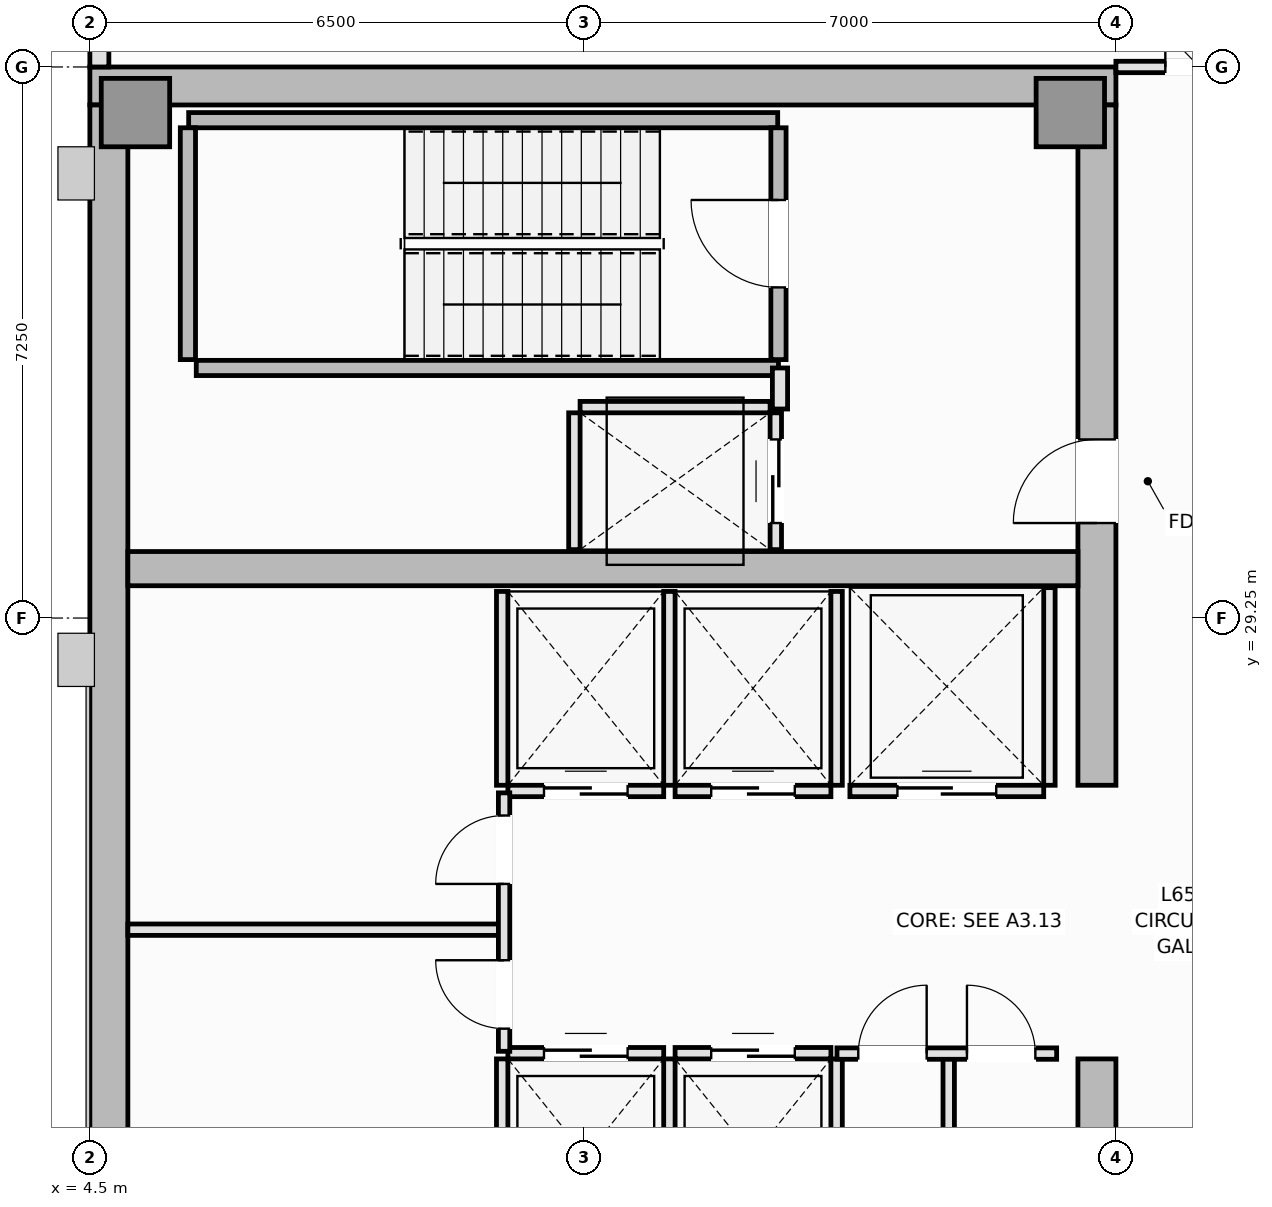
"""IFC4 building model, lengths in metres.
Left out: names, types, materials, properties, quantities, classifications, styles, units other than length and angle.
Written with IfcOpenShell. Run it as: python <this file> out.ifc"""

import sys

from ifc_helpers import new_model, si_unit, direction, frame, frame_2d, origin, origin_2d, place, context, subcontext, project, spatial, rectangle, extrude, element, fill, save


model = new_model("IFC4")
c1 = context("Model", 3, precision=1e-05, world=origin(), true_north=direction((0.0, 1.0)))
c2 = subcontext(c1, "Body", "Model", "MODEL_VIEW")
j1 = project(units=[si_unit("LENGTHUNIT", "METRE"), si_unit("PLANEANGLEUNIT", "RADIAN")], contexts=[c1])
p1 = place(None, origin())
s1 = spatial("IfcSite", under=j1, at=p1, CompositionType="ELEMENT")
p2 = place(p1, origin())
s2 = spatial("IfcBuilding", under=s1, at=p2, CompositionType="ELEMENT")
p3 = place(p2, frame((0.0, 0.0, 244.85)))
s3 = spatial("IfcBuildingStorey", under=s2, at=p3, CompositionType="ELEMENT", Elevation=244.85)
p4 = place(p3, frame((4.5, 36.25, 0.0), z_axis=(0.0, 0.0, 1.0), x_axis=(1.0, 0.0, 0.0)))
e1 = element("IfcWall", 1, at=p4, inside=s3, PredefinedType="SHEAR", context=c2, shape_type="SweptSolid", body=[
    extrude(rectangle(XDim=13.5, YDim=0.5, at=frame_2d((6.75, 0.0))), origin(), (0.0, 0.0, 1.0), 4.4),
])
p5 = place(p3, frame((4.75, 14.5, 0.0), z_axis=(0.0, 0.0, 1.0), x_axis=(0.0, 1.0, 0.0)))
e2 = element("IfcWall", 2, at=p5, inside=s3, PredefinedType="SHEAR", context=c2, shape_type="SweptSolid", body=[
    extrude(rectangle(XDim=21.5, YDim=0.5, at=frame_2d((10.75, 0.0))), origin(), (0.0, 0.0, 1.0), 4.4),
])
p6 = place(p3, frame((17.75, 14.5, 0.0), z_axis=(0.0, 0.0, 1.0), x_axis=(0.0, 1.0, 0.0)))
e3 = element("IfcWall", 3, at=p6, inside=s3, PredefinedType="SHEAR", context=c2, shape_type="SweptSolid", body=[
    extrude(rectangle(XDim=8.95, YDim=0.5, at=frame_2d((4.475, 0.0))), origin(), (0.0, 0.0, 1.0), 4.4),
])
p7 = place(p6, frame((4.4, 0.0, 0.0)))
e4 = element("IfcOpeningElement", 4, at=p7, cuts=e3, PredefinedType="OPENING", context=c2, shape_type="SweptSolid", body=[
    extrude(rectangle(XDim=1.1, YDim=2.15, at=frame_2d((0.55, 1.075))), frame((0.0, 0.26, 0.0), z_axis=(0.0, -1.0, 0.0), x_axis=(1.0, 0.0, 0.0)), (0.0, 0.0, 1.0), 0.52),
])
p8 = place(p3, frame((17.75, 27.05, 0.0), z_axis=(0.0, 0.0, 1.0), x_axis=(0.0, 1.0, 0.0)))
e5 = element("IfcWall", 5, at=p8, inside=s3, PredefinedType="SHEAR", context=c2, shape_type="SweptSolid", body=[
    extrude(rectangle(XDim=8.95, YDim=0.5, at=frame_2d((4.475, 0.0))), origin(), (0.0, 0.0, 1.0), 4.4),
])
p9 = place(p8, frame((3.45, 0.0, 0.0)))
e6 = element("IfcOpeningElement", 6, at=p9, cuts=e5, PredefinedType="OPENING", context=c2, shape_type="SweptSolid", body=[
    extrude(rectangle(XDim=1.1, YDim=2.15, at=frame_2d((0.55, 1.075))), frame((0.0, 0.26, 0.0), z_axis=(0.0, -1.0, 0.0), x_axis=(1.0, 0.0, 0.0)), (0.0, 0.0, 1.0), 0.52),
])
p10 = place(p3, frame((5.0, 29.9, 0.0), z_axis=(0.0, 0.0, 1.0), x_axis=(1.0, 0.0, 0.0)))
e7 = element("IfcWall", 7, at=p10, inside=s3, PredefinedType="SHEAR", context=c2, shape_type="SweptSolid", body=[
    extrude(rectangle(XDim=12.5, YDim=0.45, at=frame_2d((6.25, 0.0))), origin(), (0.0, 0.0, 1.0), 4.4),
])
for number, where, z_axis, x_axis in (
    (8, (5.1, 35.9, 0.0), (0.0, 0.0, 1.0), (1.0, 0.0, 0.0)),
    (9, (17.4, 35.9, 0.0), (0.0, 0.0, 1.0), (1.0, 0.0, 0.0)),
):
    element("IfcColumn", number, at=place(p3, frame(where, z_axis=z_axis, x_axis=x_axis)), inside=s3, PredefinedType="PILASTER", context=c2, shape_type="SweptSolid", body=[
        extrude(rectangle(XDim=0.9, YDim=0.9, at=origin_2d()), origin(), (0.0, 0.0, 1.0), 4.4),
    ])
p11 = place(p3, frame((4.625, 39.4, 0.0), z_axis=(0.0, 0.0, 1.0), x_axis=(0.0, -1.0, 0.0)))
e10 = element("IfcWall", 10, at=p11, inside=s3, PredefinedType="SOLIDWALL", context=c2, shape_type="SweptSolid", body=[
    extrude(rectangle(XDim=2.9, YDim=0.25, at=frame_2d((1.45, 0.0))), origin(), (0.0, 0.0, 1.0), 4.24),
])
p12 = place(p3, frame((5.8, 35.8, 0.0), z_axis=(0.0, 0.0, 1.0), x_axis=(1.0, 0.0, 0.0)))
e11 = element("IfcWall", 11, at=p12, inside=s3, PredefinedType="SOLIDWALL", context=c2, shape_type="SweptSolid", body=[
    extrude(rectangle(XDim=7.75, YDim=0.2, at=frame_2d((3.875, 0.0))), origin(), (0.0, 0.0, 1.0), 4.4),
])
p13 = place(p3, frame((5.79, 32.65, 0.0), z_axis=(0.0, 0.0, 1.0), x_axis=(0.0, 1.0, 0.0)))
e12 = element("IfcWall", 12, at=p13, inside=s3, PredefinedType="SOLIDWALL", context=c2, shape_type="SweptSolid", body=[
    extrude(rectangle(XDim=3.05, YDim=0.2, at=frame_2d((1.525, 0.0))), origin(), (0.0, 0.0, 1.0), 4.4),
])
p14 = place(p3, frame((5.9, 32.54, 0.0), z_axis=(0.0, 0.0, 1.0), x_axis=(1.0, 0.0, 0.0)))
e13 = element("IfcWall", 13, at=p14, inside=s3, PredefinedType="SOLIDWALL", context=c2, shape_type="SweptSolid", body=[
    extrude(rectangle(XDim=7.66, YDim=0.2, at=frame_2d((3.83, 0.0))), origin(), (0.0, 0.0, 1.0), 4.4),
])
p15 = place(p3, frame((13.56, 32.65, 0.0), z_axis=(0.0, 0.0, 1.0), x_axis=(0.0, 1.0, 0.0)))
e14 = element("IfcWall", 14, at=p15, inside=s3, PredefinedType="SOLIDWALL", context=c2, shape_type="SweptSolid", body=[
    extrude(rectangle(XDim=3.05, YDim=0.2, at=frame_2d((1.525, 0.0))), origin(), (0.0, 0.0, 1.0), 4.4),
])
p16 = place(p15, frame((0.95, 0.0, 0.0)))
e15 = element("IfcOpeningElement", 15, at=p16, cuts=e14, PredefinedType="OPENING", context=c2, shape_type="SweptSolid", body=[
    extrude(rectangle(XDim=1.15, YDim=2.15, at=frame_2d((0.575, 1.075))), frame((0.0, 0.11, 0.0), z_axis=(0.0, -1.0, 0.0), x_axis=(1.0, 0.0, 0.0)), (0.0, 0.0, 1.0), 0.22),
])
p17 = place(p3, frame((10.0, 23.525, 0.0), z_axis=(0.0, 0.0, 1.0), x_axis=(1.0, 0.0, 0.0)))
e16 = element("IfcWall", 16, at=p17, inside=s3, PredefinedType="PARTITIONING", context=c2, shape_type="SweptSolid", body=[
    extrude(rectangle(XDim=2.05, YDim=0.15, at=frame_2d((1.025, 0.0))), origin(), (0.0, 0.0, 1.0), 4.24),
])
p18 = place(p17, frame((0.475, 0.0, 0.0)))
e17 = element("IfcOpeningElement", 17, at=p18, cuts=e16, PredefinedType="OPENING", context=c2, shape_type="SweptSolid", body=[
    extrude(rectangle(XDim=1.1, YDim=2.2, at=frame_2d((0.55, 1.1))), frame((0.0, 0.085, 0.0), z_axis=(0.0, -1.0, 0.0), x_axis=(1.0, 0.0, 0.0)), (0.0, 0.0, 1.0), 0.17),
])
for number, where, z_axis, x_axis in (
    (18, (9.925, 20.9, 0.0), (0.0, 0.0, 1.0), (0.0, 1.0, 0.0)),
    (19, (12.125, 20.9, 0.0), (0.0, 0.0, 1.0), (0.0, 1.0, 0.0)),
):
    element("IfcWall", number, at=place(p3, frame(where, z_axis=z_axis, x_axis=x_axis)), inside=s3, PredefinedType="PARTITIONING", context=c2, shape_type="SweptSolid", body=[
        extrude(rectangle(XDim=2.55, YDim=0.15, at=frame_2d((1.275, 0.0))), origin(), (0.0, 0.0, 1.0), 4.24),
    ])
p19 = place(p3, frame((12.2, 23.525, 0.0), z_axis=(0.0, 0.0, 1.0), x_axis=(1.0, 0.0, 0.0)))
e20 = element("IfcWall", 20, at=p19, inside=s3, PredefinedType="PARTITIONING", context=c2, shape_type="SweptSolid", body=[
    extrude(rectangle(XDim=2.05, YDim=0.15, at=frame_2d((1.025, 0.0))), origin(), (0.0, 0.0, 1.0), 4.24),
])
p20 = place(p19, frame((0.475, 0.0, 0.0)))
e21 = element("IfcOpeningElement", 21, at=p20, cuts=e20, PredefinedType="OPENING", context=c2, shape_type="SweptSolid", body=[
    extrude(rectangle(XDim=1.1, YDim=2.2, at=frame_2d((0.55, 1.1))), frame((0.0, 0.085, 0.0), z_axis=(0.0, -1.0, 0.0), x_axis=(1.0, 0.0, 0.0)), (0.0, 0.0, 1.0), 0.17),
])
p21 = place(p3, frame((14.325, 20.9, 0.0), z_axis=(0.0, 0.0, 1.0), x_axis=(0.0, 1.0, 0.0)))
e22 = element("IfcWall", 22, at=p21, inside=s3, PredefinedType="PARTITIONING", context=c2, shape_type="SweptSolid", body=[
    extrude(rectangle(XDim=2.55, YDim=0.15, at=frame_2d((1.275, 0.0))), origin(), (0.0, 0.0, 1.0), 4.24),
])
p22 = place(p3, frame((10.0, 26.975, 0.0), z_axis=(0.0, 0.0, 1.0), x_axis=(1.0, 0.0, 0.0)))
e23 = element("IfcWall", 23, at=p22, inside=s3, PredefinedType="PARTITIONING", context=c2, shape_type="SweptSolid", body=[
    extrude(rectangle(XDim=2.05, YDim=0.15, at=frame_2d((1.025, 0.0))), origin(), (0.0, 0.0, 1.0), 4.24),
])
p23 = place(p22, frame((0.475, 0.0, 0.0)))
e24 = element("IfcOpeningElement", 24, at=p23, cuts=e23, PredefinedType="OPENING", context=c2, shape_type="SweptSolid", body=[
    extrude(rectangle(XDim=1.1, YDim=2.2, at=frame_2d((0.55, 1.1))), frame((0.0, 0.085, 0.0), z_axis=(0.0, -1.0, 0.0), x_axis=(1.0, 0.0, 0.0)), (0.0, 0.0, 1.0), 0.17),
])
for number, where, z_axis, x_axis in (
    (25, (9.925, 27.05, 0.0), (0.0, 0.0, 1.0), (0.0, 1.0, 0.0)),
    (26, (12.125, 27.05, 0.0), (0.0, 0.0, 1.0), (0.0, 1.0, 0.0)),
):
    element("IfcWall", number, at=place(p3, frame(where, z_axis=z_axis, x_axis=x_axis)), inside=s3, PredefinedType="PARTITIONING", context=c2, shape_type="SweptSolid", body=[
        extrude(rectangle(XDim=2.55, YDim=0.15, at=frame_2d((1.275, 0.0))), origin(), (0.0, 0.0, 1.0), 4.24),
    ])
p24 = place(p3, frame((12.2, 26.975, 0.0), z_axis=(0.0, 0.0, 1.0), x_axis=(1.0, 0.0, 0.0)))
e27 = element("IfcWall", 27, at=p24, inside=s3, PredefinedType="PARTITIONING", context=c2, shape_type="SweptSolid", body=[
    extrude(rectangle(XDim=2.05, YDim=0.15, at=frame_2d((1.025, 0.0))), origin(), (0.0, 0.0, 1.0), 4.24),
])
p25 = place(p24, frame((0.475, 0.0, 0.0)))
e28 = element("IfcOpeningElement", 28, at=p25, cuts=e27, PredefinedType="OPENING", context=c2, shape_type="SweptSolid", body=[
    extrude(rectangle(XDim=1.1, YDim=2.2, at=frame_2d((0.55, 1.1))), frame((0.0, 0.085, 0.0), z_axis=(0.0, -1.0, 0.0), x_axis=(1.0, 0.0, 0.0)), (0.0, 0.0, 1.0), 0.17),
])
p26 = place(p3, frame((14.325, 27.05, 0.0), z_axis=(0.0, 0.0, 1.0), x_axis=(0.0, 1.0, 0.0)))
e29 = element("IfcWall", 29, at=p26, inside=s3, PredefinedType="PARTITIONING", context=c2, shape_type="SweptSolid", body=[
    extrude(rectangle(XDim=2.55, YDim=0.15, at=frame_2d((1.275, 0.0))), origin(), (0.0, 0.0, 1.0), 4.24),
])
p27 = place(p3, frame((14.5, 26.975, 0.0), z_axis=(0.0, 0.0, 1.0), x_axis=(1.0, 0.0, 0.0)))
e30 = element("IfcWall", 30, at=p27, inside=s3, PredefinedType="PARTITIONING", context=c2, shape_type="SweptSolid", body=[
    extrude(rectangle(XDim=2.55, YDim=0.15, at=frame_2d((1.275, 0.0))), origin(), (0.0, 0.0, 1.0), 4.24),
])
p28 = place(p27, frame((0.625, 0.0, 0.0)))
e31 = element("IfcOpeningElement", 31, at=p28, cuts=e30, PredefinedType="OPENING", context=c2, shape_type="SweptSolid", body=[
    extrude(rectangle(XDim=1.3, YDim=2.2, at=frame_2d((0.65, 1.1))), frame((0.0, 0.085, 0.0), z_axis=(0.0, -1.0, 0.0), x_axis=(1.0, 0.0, 0.0)), (0.0, 0.0, 1.0), 0.17),
])
p29 = place(p3, frame((17.125, 27.05, 0.0), z_axis=(0.0, 0.0, 1.0), x_axis=(0.0, 1.0, 0.0)))
e32 = element("IfcWall", 32, at=p29, inside=s3, PredefinedType="PARTITIONING", context=c2, shape_type="SweptSolid", body=[
    extrude(rectangle(XDim=2.6, YDim=0.15, at=frame_2d((1.3, 0.0))), origin(), (0.0, 0.0, 1.0), 4.24),
])
p30 = place(p3, frame((10.95, 32.025, 0.0), z_axis=(0.0, 0.0, 1.0), x_axis=(1.0, 0.0, 0.0)))
e33 = element("IfcWall", 33, at=p30, inside=s3, PredefinedType="PARTITIONING", context=c2, shape_type="SweptSolid", body=[
    extrude(rectangle(XDim=2.5, YDim=0.15, at=frame_2d((1.25, 0.0))), origin(), (0.0, 0.0, 1.0), 4.24),
])
p31 = place(p3, frame((10.875, 30.15, 0.0), z_axis=(0.0, 0.0, 1.0), x_axis=(0.0, 1.0, 0.0)))
e34 = element("IfcWall", 34, at=p31, inside=s3, PredefinedType="PARTITIONING", context=c2, shape_type="SweptSolid", body=[
    extrude(rectangle(XDim=1.8, YDim=0.15, at=frame_2d((0.9, 0.0))), origin(), (0.0, 0.0, 1.0), 4.24),
])
p32 = place(p3, frame((13.525, 30.15, 0.0), z_axis=(0.0, 0.0, 1.0), x_axis=(0.0, 1.0, 0.0)))
e35 = element("IfcWall", 35, at=p32, inside=s3, PredefinedType="PARTITIONING", context=c2, shape_type="SweptSolid", body=[
    extrude(rectangle(XDim=1.8, YDim=0.15, at=frame_2d((0.9, 0.0))), origin(), (0.0, 0.0, 1.0), 4.24),
])
p33 = place(p32, frame((0.35, 0.0, 0.0)))
e36 = element("IfcOpeningElement", 36, at=p33, cuts=e35, PredefinedType="OPENING", context=c2, shape_type="SweptSolid", body=[
    extrude(rectangle(XDim=1.1, YDim=2.2, at=frame_2d((0.55, 1.1))), frame((0.0, 0.085, 0.0), z_axis=(0.0, -1.0, 0.0), x_axis=(1.0, 0.0, 0.0)), (0.0, 0.0, 1.0), 0.17),
])
p34 = place(p3, frame((13.58, 32.0, 0.0), z_axis=(0.0, 0.0, 1.0), x_axis=(0.0, 1.0, 0.0)))
e37 = element("IfcWall", 37, at=p34, inside=s3, PredefinedType="PARTITIONING", context=c2, shape_type="SweptSolid", body=[
    extrude(rectangle(XDim=0.54, YDim=0.2, at=frame_2d((0.27, 0.0))), origin(), (0.0, 0.0, 1.0), 4.24),
])
p35 = place(p3, frame((5.0, 25.15, 0.0), z_axis=(0.0, 0.0, 1.0), x_axis=(1.0, 0.0, 0.0)))
e38 = element("IfcWall", 38, at=p35, inside=s3, PredefinedType="PARTITIONING", context=c2, shape_type="SweptSolid", body=[
    extrude(rectangle(XDim=4.95, YDim=0.15, at=frame_2d((2.475, 0.0))), origin(), (0.0, 0.0, 1.0), 4.24),
])
p36 = place(p3, frame((9.95, 23.55, 0.0), z_axis=(0.0, 0.0, 1.0), x_axis=(0.0, 1.0, 0.0)))
e39 = element("IfcWall", 39, at=p36, inside=s3, PredefinedType="PARTITIONING", context=c2, shape_type="SweptSolid", body=[
    extrude(rectangle(XDim=3.4, YDim=0.15, at=frame_2d((1.7, 0.0))), origin(), (0.0, 0.0, 1.0), 4.24),
])
p37 = place(p36, frame((0.298, 0.0, 0.0)))
e40 = element("IfcOpeningElement", 40, at=p37, cuts=e39, PredefinedType="OPENING", context=c2, shape_type="SweptSolid", body=[
    extrude(rectangle(XDim=0.9, YDim=2.1, at=frame_2d((0.45, 1.05))), frame((0.0, 0.085, 0.0), z_axis=(0.0, -1.0, 0.0), x_axis=(1.0, 0.0, 0.0)), (0.0, 0.0, 1.0), 0.17),
])
p38 = place(p36, frame((2.202, 0.0, 0.0)))
e41 = element("IfcOpeningElement", 41, at=p38, cuts=e39, PredefinedType="OPENING", context=c2, shape_type="SweptSolid", body=[
    extrude(rectangle(XDim=0.9, YDim=2.1, at=frame_2d((0.45, 1.05))), frame((0.0, 0.085, 0.0), z_axis=(0.0, -1.0, 0.0), x_axis=(1.0, 0.0, 0.0)), (0.0, 0.0, 1.0), 0.17),
])
p39 = place(p3, frame((15.8, 20.85, 0.0), z_axis=(0.0, 0.0, 1.0), x_axis=(0.0, 1.0, 0.0)))
e42 = element("IfcWall", 42, at=p39, inside=s3, PredefinedType="PARTITIONING", context=c2, shape_type="SweptSolid", body=[
    extrude(rectangle(XDim=2.67, YDim=0.15, at=frame_2d((1.335, 0.0))), origin(), (0.0, 0.0, 1.0), 4.24),
])
p40 = place(p3, frame((14.33, 23.52, 0.0), z_axis=(0.0, 0.0, 1.0), x_axis=(1.0, 0.0, 0.0)))
e43 = element("IfcWall", 43, at=p40, inside=s3, PredefinedType="PARTITIONING", context=c2, shape_type="SweptSolid", body=[
    extrude(rectangle(XDim=2.89, YDim=0.15, at=frame_2d((1.445, 0.0))), origin(), (0.0, 0.0, 1.0), 4.24),
])
p41 = place(p40, frame((0.28, 0.0, 0.0)))
e44 = element("IfcOpeningElement", 44, at=p41, cuts=e43, PredefinedType="OPENING", context=c2, shape_type="SweptSolid", body=[
    extrude(rectangle(XDim=0.9, YDim=2.1, at=frame_2d((0.45, 1.05))), frame((0.0, 0.085, 0.0), z_axis=(0.0, -1.0, 0.0), x_axis=(1.0, 0.0, 0.0)), (0.0, 0.0, 1.0), 0.17),
])
p42 = place(p40, frame((1.71, 0.0, 0.0)))
e45 = element("IfcOpeningElement", 45, at=p42, cuts=e43, PredefinedType="OPENING", context=c2, shape_type="SweptSolid", body=[
    extrude(rectangle(XDim=0.9, YDim=2.1, at=frame_2d((0.45, 1.05))), frame((0.0, 0.085, 0.0), z_axis=(0.0, -1.0, 0.0), x_axis=(1.0, 0.0, 0.0)), (0.0, 0.0, 1.0), 0.17),
])
p43 = place(p3, frame((18.0, 36.5, 0.0), z_axis=(0.0, 0.0, 1.0), x_axis=(1.0, 0.0, 0.0)))
e46 = element("IfcWall", 46, at=p43, inside=s3, PredefinedType="PARTITIONING", context=c2, shape_type="SweptSolid", body=[
    extrude(rectangle(XDim=2.2, YDim=0.15, at=frame_2d((1.1, 0.0))), origin(), (0.0, 0.0, 1.0), 4.24),
])
p44 = place(p43, frame((0.65, 0.0, 0.0)))
e47 = element("IfcOpeningElement", 47, at=p44, cuts=e46, PredefinedType="OPENING", context=c2, shape_type="SweptSolid", body=[
    extrude(rectangle(XDim=0.9, YDim=2.1, at=frame_2d((0.45, 1.05))), frame((0.0, 0.085, 0.0), z_axis=(0.0, -1.0, 0.0), x_axis=(1.0, 0.0, 0.0)), (0.0, 0.0, 1.0), 0.17),
])
p45 = place(p16, origin())
e48 = element("IfcDoor", 48, at=p45, inside=s3, OperationType="SINGLE_SWING_RIGHT", PredefinedType="DOOR", context=c2, shape_type="SweptSolid", body=[
    extrude(rectangle(XDim=1.15, YDim=2.15, at=frame_2d((0.575, 1.075))), frame((0.0, 0.025, 0.0), z_axis=(0.0, -1.0, 0.0), x_axis=(1.0, 0.0, 0.0)), (0.0, 0.0, 1.0), 0.05),
])
fill(e15, e48)
p46 = place(p18, origin())
e49 = element("IfcDoor", 49, at=p46, inside=s3, OperationType="DOUBLE_DOOR_SLIDING", PredefinedType="DOOR", context=c2, shape_type="SweptSolid", body=[
    extrude(rectangle(XDim=1.1, YDim=2.2, at=frame_2d((0.55, 1.1))), frame((0.0, 0.025, 0.0), z_axis=(0.0, -1.0, 0.0), x_axis=(1.0, 0.0, 0.0)), (0.0, 0.0, 1.0), 0.05),
])
fill(e17, e49)
p47 = place(p20, origin())
e50 = element("IfcDoor", 50, at=p47, inside=s3, OperationType="DOUBLE_DOOR_SLIDING", PredefinedType="DOOR", context=c2, shape_type="SweptSolid", body=[
    extrude(rectangle(XDim=1.1, YDim=2.2, at=frame_2d((0.55, 1.1))), frame((0.0, 0.025, 0.0), z_axis=(0.0, -1.0, 0.0), x_axis=(1.0, 0.0, 0.0)), (0.0, 0.0, 1.0), 0.05),
])
fill(e21, e50)
p48 = place(p23, origin())
e51 = element("IfcDoor", 51, at=p48, inside=s3, OperationType="DOUBLE_DOOR_SLIDING", PredefinedType="DOOR", context=c2, shape_type="SweptSolid", body=[
    extrude(rectangle(XDim=1.1, YDim=2.2, at=frame_2d((0.55, 1.1))), frame((0.0, 0.025, 0.0), z_axis=(0.0, -1.0, 0.0), x_axis=(1.0, 0.0, 0.0)), (0.0, 0.0, 1.0), 0.05),
])
fill(e24, e51)
p49 = place(p25, origin())
e52 = element("IfcDoor", 52, at=p49, inside=s3, OperationType="DOUBLE_DOOR_SLIDING", PredefinedType="DOOR", context=c2, shape_type="SweptSolid", body=[
    extrude(rectangle(XDim=1.1, YDim=2.2, at=frame_2d((0.55, 1.1))), frame((0.0, 0.025, 0.0), z_axis=(0.0, -1.0, 0.0), x_axis=(1.0, 0.0, 0.0)), (0.0, 0.0, 1.0), 0.05),
])
fill(e28, e52)
p50 = place(p28, origin())
e53 = element("IfcDoor", 53, at=p50, inside=s3, OperationType="DOUBLE_DOOR_SLIDING", PredefinedType="DOOR", context=c2, shape_type="SweptSolid", body=[
    extrude(rectangle(XDim=1.3, YDim=2.2, at=frame_2d((0.65, 1.1))), frame((0.0, 0.025, 0.0), z_axis=(0.0, -1.0, 0.0), x_axis=(1.0, 0.0, 0.0)), (0.0, 0.0, 1.0), 0.05),
])
fill(e31, e53)
p51 = place(p33, origin())
e54 = element("IfcDoor", 54, at=p51, inside=s3, OperationType="DOUBLE_DOOR_SLIDING", PredefinedType="DOOR", context=c2, shape_type="SweptSolid", body=[
    extrude(rectangle(XDim=1.1, YDim=2.2, at=frame_2d((0.55, 1.1))), frame((0.0, 0.025, 0.0), z_axis=(0.0, -1.0, 0.0), x_axis=(1.0, 0.0, 0.0)), (0.0, 0.0, 1.0), 0.05),
])
fill(e36, e54)
p52 = place(p9, origin())
e55 = element("IfcDoor", 55, at=p52, inside=s3, OperationType="SINGLE_SWING_LEFT", PredefinedType="DOOR", context=c2, shape_type="SweptSolid", body=[
    extrude(rectangle(XDim=1.1, YDim=2.15, at=frame_2d((0.55, 1.075))), frame((0.0, 0.025, 0.0), z_axis=(0.0, -1.0, 0.0), x_axis=(1.0, 0.0, 0.0)), (0.0, 0.0, 1.0), 0.05),
])
fill(e6, e55)
p53 = place(p37, origin())
e56 = element("IfcDoor", 56, at=p53, inside=s3, OperationType="SINGLE_SWING_RIGHT", PredefinedType="DOOR", context=c2, shape_type="SweptSolid", body=[
    extrude(rectangle(XDim=0.9, YDim=2.1, at=frame_2d((0.45, 1.05))), frame((0.0, 0.025, 0.0), z_axis=(0.0, -1.0, 0.0), x_axis=(1.0, 0.0, 0.0)), (0.0, 0.0, 1.0), 0.05),
])
fill(e40, e56)
p54 = place(p38, origin())
e57 = element("IfcDoor", 57, at=p54, inside=s3, OperationType="SINGLE_SWING_LEFT", PredefinedType="DOOR", context=c2, shape_type="SweptSolid", body=[
    extrude(rectangle(XDim=0.9, YDim=2.1, at=frame_2d((0.45, 1.05))), frame((0.0, 0.025, 0.0), z_axis=(0.0, -1.0, 0.0), x_axis=(1.0, 0.0, 0.0)), (0.0, 0.0, 1.0), 0.05),
])
fill(e41, e57)
p55 = place(p41, origin())
e58 = element("IfcDoor", 58, at=p55, inside=s3, OperationType="SINGLE_SWING_RIGHT", PredefinedType="DOOR", context=c2, shape_type="SweptSolid", body=[
    extrude(rectangle(XDim=0.9, YDim=2.1, at=frame_2d((0.45, 1.05))), frame((0.0, 0.025, 0.0), z_axis=(0.0, -1.0, 0.0), x_axis=(1.0, 0.0, 0.0)), (0.0, 0.0, 1.0), 0.05),
])
fill(e44, e58)
p56 = place(p42, origin())
e59 = element("IfcDoor", 59, at=p56, inside=s3, OperationType="SINGLE_SWING_LEFT", PredefinedType="DOOR", context=c2, shape_type="SweptSolid", body=[
    extrude(rectangle(XDim=0.9, YDim=2.1, at=frame_2d((0.45, 1.05))), frame((0.0, 0.025, 0.0), z_axis=(0.0, -1.0, 0.0), x_axis=(1.0, 0.0, 0.0)), (0.0, 0.0, 1.0), 0.05),
])
fill(e45, e59)
p57 = place(p44, origin())
e60 = element("IfcDoor", 60, at=p57, inside=s3, OperationType="SINGLE_SWING_LEFT", PredefinedType="DOOR", context=c2, shape_type="SweptSolid", body=[
    extrude(rectangle(XDim=0.9, YDim=2.1, at=frame_2d((0.45, 1.05))), frame((0.0, 0.025, 0.0), z_axis=(0.0, -1.0, 0.0), x_axis=(1.0, 0.0, 0.0)), (0.0, 0.0, 1.0), 0.05),
])
fill(e47, e60)
save(model, sys.argv[1])
